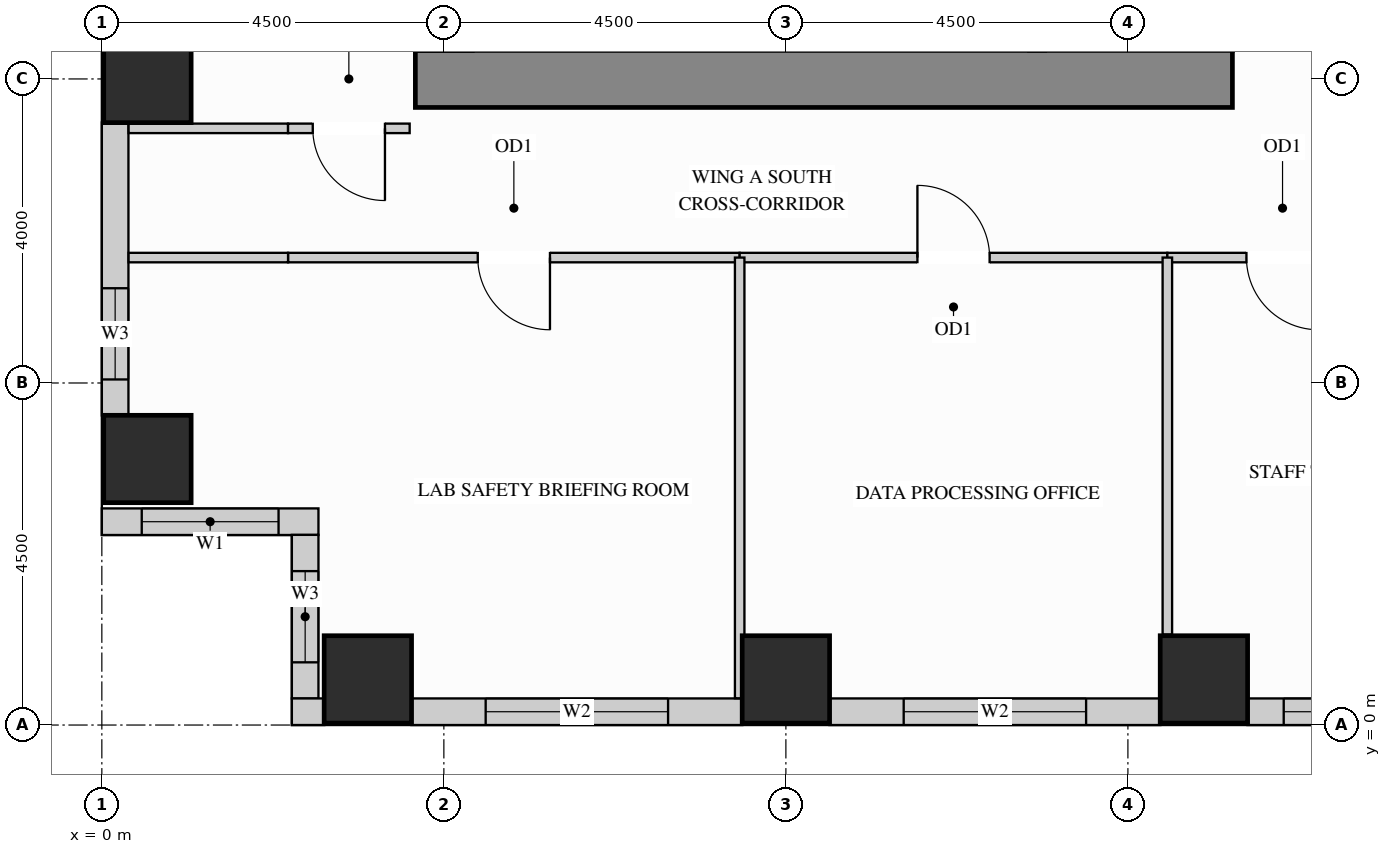
"""IFC4 building model, lengths in metres.
Left out: names, types, materials, properties, quantities, classifications, styles, units other than length and angle.
Written with IfcOpenShell. Run it as: python <this file> out.ifc"""

import sys

from ifc_helpers import new_model, si_unit, direction, frame, frame_2d, origin, origin_2d, place, context, subcontext, project, spatial, rectangle, extrude, source, transform, mapped, element, fill, save


model = new_model("IFC4")
c1 = context("Model", 3, precision=1e-05, world=origin(), true_north=direction((0.0, 1.0)))
c2 = subcontext(c1, "Body", "Model", "MODEL_VIEW")
j1 = project(units=[si_unit("LENGTHUNIT", "METRE"), si_unit("PLANEANGLEUNIT", "RADIAN")], contexts=[c1])
p1 = place(None, origin())
s1 = spatial("IfcSite", under=j1, at=p1, CompositionType="ELEMENT")
p2 = place(p1, origin())
s2 = spatial("IfcBuilding", under=s1, at=p2, CompositionType="ELEMENT")
p3 = place(p2, frame((0.0, 0.0, 95.4)))
s3 = spatial("IfcBuildingStorey", under=s2, at=p3, CompositionType="ELEMENT", Elevation=95.4)
m1 = source(origin(), c2, "Body", "SweptSolid", [
    extrude(rectangle(XDim=1.15, YDim=1.15, at=origin_2d()), origin(), (0.0, 0.0, 1.0), 3.38),
])
for number, where, z_axis, x_axis in (
    (1, (14.5, 0.6, 0.0), (0.0, 0.0, 1.0), (1.0, 0.0, 0.0)),
    (2, (3.5, 0.6, 0.0), (0.0, 0.0, 1.0), (1.0, 0.0, 0.0)),
    (3, (9.0, 0.6, 0.0), (0.0, 0.0, 1.0), (1.0, 0.0, 0.0)),
    (4, (0.6, 3.5, 0.0), (0.0, 0.0, 1.0), (1.0, 0.0, 0.0)),
    (5, (0.6, 8.5, 0.0), (0.0, 0.0, 1.0), (1.0, 0.0, 0.0)),
):
    element("IfcColumn", number, at=place(p3, frame(where, z_axis=z_axis, x_axis=x_axis)), inside=s3, PredefinedType="COLUMN", context=c2, shape_type="MappedRepresentation", body=[
        mapped(m1, transform((0.0, 0.0, 0.0), x_axis=(1.0, 0.0, 0.0), y_axis=(0.0, 1.0, 0.0), z_axis=(0.0, 0.0, 1.0))),
    ])
m2 = source(origin(), c2, "Body", "SweptSolid", [
    extrude(rectangle(XDim=10.75, YDim=0.75, at=frame_2d((5.375, 0.0))), origin(), (0.0, 0.0, 1.0), 3.38),
])
p4 = place(p3, frame((4.125, 8.5, 0.0), z_axis=(0.0, 0.0, 1.0), x_axis=(1.0, 0.0, 0.0)))
e6 = element("IfcWall", 6, at=p4, inside=s3, PredefinedType="SHEAR", context=c2, shape_type="MappedRepresentation", body=[
    mapped(m2, transform((0.0, 0.0, 0.0), x_axis=(1.0, 0.0, 0.0), y_axis=(0.0, 1.0, 0.0), z_axis=(0.0, 0.0, 1.0))),
])
p5 = place(p3, frame((0.175, 7.927, 0.0), z_axis=(0.0, 0.0, 1.0), x_axis=(0.0, -1.0, 0.0)))
e7 = element("IfcWall", 7, at=p5, inside=s3, PredefinedType="SOLIDWALL", context=c2, shape_type="SweptSolid", body=[
    extrude(rectangle(XDim=3.854, YDim=0.35, at=frame_2d((1.927, 0.0))), origin(), (0.0, 0.0, 1.0), 3.365),
])
p6 = place(p5, frame((2.18, 0.0, 0.78)))
e8 = element("IfcOpeningElement", 8, at=p6, cuts=e7, PredefinedType="OPENING", context=c2, shape_type="SweptSolid", body=[
    extrude(rectangle(XDim=1.2, YDim=2.1, at=frame_2d((0.6, 1.05))), frame((0.0, 0.185, 0.0), z_axis=(0.0, -1.0, 0.0), x_axis=(1.0, 0.0, 0.0)), (0.0, 0.0, 1.0), 0.37),
])
p7 = place(p3, frame((0.0, 2.675, 0.0), z_axis=(0.0, 0.0, 1.0), x_axis=(1.0, 0.0, 0.0)))
e9 = element("IfcWall", 9, at=p7, inside=s3, PredefinedType="SOLIDWALL", context=c2, shape_type="SweptSolid", body=[
    extrude(rectangle(XDim=2.85, YDim=0.35, at=frame_2d((1.425, 0.0))), origin(), (0.0, 0.0, 1.0), 3.365),
])
p8 = place(p7, frame((0.525, 0.0, 0.78)))
e10 = element("IfcOpeningElement", 10, at=p8, cuts=e9, PredefinedType="OPENING", context=c2, shape_type="SweptSolid", body=[
    extrude(rectangle(XDim=1.8, YDim=2.1, at=frame_2d((0.9, 1.05))), frame((0.0, 0.185, 0.0), z_axis=(0.0, -1.0, 0.0), x_axis=(1.0, 0.0, 0.0)), (0.0, 0.0, 1.0), 0.37),
])
p9 = place(p3, frame((2.675, 2.502, 0.0), z_axis=(0.0, 0.0, 1.0), x_axis=(0.0, -1.0, 0.0)))
e11 = element("IfcWall", 11, at=p9, inside=s3, PredefinedType="SOLIDWALL", context=c2, shape_type="SweptSolid", body=[
    extrude(rectangle(XDim=2.154, YDim=0.35, at=frame_2d((1.077, 0.0))), origin(), (0.0, 0.0, 1.0), 3.365),
])
p10 = place(p9, frame((0.477, 0.0, 0.78)))
e12 = element("IfcOpeningElement", 12, at=p10, cuts=e11, PredefinedType="OPENING", context=c2, shape_type="SweptSolid", body=[
    extrude(rectangle(XDim=1.2, YDim=2.1, at=frame_2d((0.6, 1.05))), frame((0.0, 0.185, 0.0), z_axis=(0.0, -1.0, 0.0), x_axis=(1.0, 0.0, 0.0)), (0.0, 0.0, 1.0), 0.37),
])
m3 = source(origin(), c2, "Body", "SweptSolid", [
    extrude(rectangle(XDim=0.427, YDim=0.35, at=frame_2d((0.213, 0.0))), origin(), (0.0, 0.0, 1.0), 3.365),
])
p11 = place(p3, frame((2.5, 0.175, 0.0), z_axis=(0.0, 0.0, 1.0), x_axis=(1.0, 0.0, 0.0)))
e13 = element("IfcWall", 13, at=p11, inside=s3, PredefinedType="SOLIDWALL", context=c2, shape_type="MappedRepresentation", body=[
    mapped(m3, transform((0.0, 0.0, 0.0), x_axis=(1.0, 0.0, 0.0), y_axis=(0.0, 1.0, 0.0), z_axis=(0.0, 0.0, 1.0))),
])
p12 = place(p3, frame((4.073, 0.175, 0.0), z_axis=(0.0, 0.0, 1.0), x_axis=(1.0, 0.0, 0.0)))
e14 = element("IfcWall", 14, at=p12, inside=s3, PredefinedType="SOLIDWALL", context=c2, shape_type="SweptSolid", body=[
    extrude(rectangle(XDim=4.354, YDim=0.35, at=frame_2d((2.177, 0.0))), origin(), (0.0, 0.0, 1.0), 3.365),
])
p13 = place(p12, frame((0.977, 0.0, 0.78)))
e15 = element("IfcOpeningElement", 15, at=p13, cuts=e14, PredefinedType="OPENING", context=c2, shape_type="SweptSolid", body=[
    extrude(rectangle(XDim=2.4, YDim=2.1, at=frame_2d((1.2, 1.05))), frame((0.0, 0.185, 0.0), z_axis=(0.0, -1.0, 0.0), x_axis=(1.0, 0.0, 0.0)), (0.0, 0.0, 1.0), 0.37),
])
p14 = place(p3, frame((9.573, 0.175, 0.0), z_axis=(0.0, 0.0, 1.0), x_axis=(1.0, 0.0, 0.0)))
e16 = element("IfcWall", 16, at=p14, inside=s3, PredefinedType="SOLIDWALL", context=c2, shape_type="SweptSolid", body=[
    extrude(rectangle(XDim=4.354, YDim=0.35, at=frame_2d((2.177, 0.0))), origin(), (0.0, 0.0, 1.0), 3.365),
])
p15 = place(p14, frame((0.977, 0.0, 0.78)))
e17 = element("IfcOpeningElement", 17, at=p15, cuts=e16, PredefinedType="OPENING", context=c2, shape_type="SweptSolid", body=[
    extrude(rectangle(XDim=2.4, YDim=2.1, at=frame_2d((1.2, 1.05))), frame((0.0, 0.185, 0.0), z_axis=(0.0, -1.0, 0.0), x_axis=(1.0, 0.0, 0.0)), (0.0, 0.0, 1.0), 0.37),
])
p16 = place(p3, frame((15.073, 0.175, 0.0), z_axis=(0.0, 0.0, 1.0), x_axis=(1.0, 0.0, 0.0)))
e18 = element("IfcWall", 18, at=p16, inside=s3, PredefinedType="SOLIDWALL", context=c2, shape_type="SweptSolid", body=[
    extrude(rectangle(XDim=3.354, YDim=0.35, at=frame_2d((1.677, 0.0))), origin(), (0.0, 0.0, 1.0), 3.365),
])
p17 = place(p16, frame((0.477, 0.0, 0.78)))
e19 = element("IfcOpeningElement", 19, at=p17, cuts=e18, PredefinedType="OPENING", context=c2, shape_type="SweptSolid", body=[
    extrude(rectangle(XDim=2.4, YDim=2.1, at=frame_2d((1.2, 1.05))), frame((0.0, 0.185, 0.0), z_axis=(0.0, -1.0, 0.0), x_axis=(1.0, 0.0, 0.0)), (0.0, 0.0, 1.0), 0.37),
])
m4 = source(origin(), c2, "Body", "SweptSolid", [
    extrude(rectangle(XDim=2.098, YDim=0.125, at=frame_2d((1.049, 0.0))), origin(), (0.0, 0.0, 1.0), 3.365),
])
p18 = place(p3, frame((0.352, 7.85, 0.0), z_axis=(0.0, 0.0, 1.0), x_axis=(1.0, 0.0, 0.0)))
e20 = element("IfcWall", 20, at=p18, inside=s3, PredefinedType="PARTITIONING", context=c2, shape_type="MappedRepresentation", body=[
    mapped(m4, transform((0.0, 0.0, 0.0), x_axis=(1.0, 0.0, 0.0), y_axis=(0.0, 1.0, 0.0), z_axis=(0.0, 0.0, 1.0))),
])
p19 = place(p3, frame((2.45, 7.85, 0.0), z_axis=(0.0, 0.0, 1.0), x_axis=(1.0, 0.0, 0.0)))
e21 = element("IfcWall", 21, at=p19, inside=s3, PredefinedType="PARTITIONING", context=c2, shape_type="SweptSolid", body=[
    extrude(rectangle(XDim=1.6, YDim=0.125, at=frame_2d((0.8, 0.0))), origin(), (0.0, 0.0, 1.0), 3.365),
])
p20 = place(p19, frame((0.325, 0.0, 0.0)))
e22 = element("IfcOpeningElement", 22, at=p20, cuts=e21, PredefinedType="OPENING", context=c2, shape_type="SweptSolid", body=[
    extrude(rectangle(XDim=0.95, YDim=2.15, at=frame_2d((0.475, 1.075))), frame((0.0, 0.073, 0.0), z_axis=(0.0, -1.0, 0.0), x_axis=(1.0, 0.0, 0.0)), (0.0, 0.0, 1.0), 0.145),
])
p21 = place(p3, frame((2.45, 6.15, 0.0), z_axis=(0.0, 0.0, 1.0), x_axis=(1.0, 0.0, 0.0)))
e23 = element("IfcWall", 23, at=p21, inside=s3, PredefinedType="PARTITIONING", context=c2, shape_type="SweptSolid", body=[
    extrude(rectangle(XDim=5.942, YDim=0.125, at=frame_2d((2.971, 0.0))), origin(), (0.0, 0.0, 1.0), 3.365),
])
p22 = place(p21, frame((2.496, 0.0, 0.0)))
e24 = element("IfcOpeningElement", 24, at=p22, cuts=e23, PredefinedType="OPENING", context=c2, shape_type="SweptSolid", body=[
    extrude(rectangle(XDim=0.95, YDim=2.15, at=frame_2d((0.475, 1.075))), frame((0.0, 0.073, 0.0), z_axis=(0.0, -1.0, 0.0), x_axis=(1.0, 0.0, 0.0)), (0.0, 0.0, 1.0), 0.145),
])
p23 = place(p3, frame((8.392, 6.15, 0.0), z_axis=(0.0, 0.0, 1.0), x_axis=(1.0, 0.0, 0.0)))
e25 = element("IfcWall", 25, at=p23, inside=s3, PredefinedType="PARTITIONING", context=c2, shape_type="SweptSolid", body=[
    extrude(rectangle(XDim=5.627, YDim=0.125, at=frame_2d((2.813, 0.0))), origin(), (0.0, 0.0, 1.0), 3.365),
])
p24 = place(p23, frame((2.338, 0.0, 0.0)))
e26 = element("IfcOpeningElement", 26, at=p24, cuts=e25, PredefinedType="OPENING", context=c2, shape_type="SweptSolid", body=[
    extrude(rectangle(XDim=0.95, YDim=2.15, at=frame_2d((0.475, 1.075))), frame((0.0, 0.073, 0.0), z_axis=(0.0, -1.0, 0.0), x_axis=(1.0, 0.0, 0.0)), (0.0, 0.0, 1.0), 0.145),
])
p25 = place(p3, frame((14.019, 6.15, 0.0), z_axis=(0.0, 0.0, 1.0), x_axis=(1.0, 0.0, 0.0)))
e27 = element("IfcWall", 27, at=p25, inside=s3, PredefinedType="PARTITIONING", context=c2, shape_type="SweptSolid", body=[
    extrude(rectangle(XDim=3.031, YDim=0.125, at=frame_2d((1.516, 0.0))), origin(), (0.0, 0.0, 1.0), 3.365),
])
p26 = place(p25, frame((1.041, 0.0, 0.0)))
e28 = element("IfcOpeningElement", 28, at=p26, cuts=e27, PredefinedType="OPENING", context=c2, shape_type="SweptSolid", body=[
    extrude(rectangle(XDim=0.95, YDim=2.15, at=frame_2d((0.475, 1.075))), frame((0.0, 0.073, 0.0), z_axis=(0.0, -1.0, 0.0), x_axis=(1.0, 0.0, 0.0)), (0.0, 0.0, 1.0), 0.145),
])
p27 = place(p3, frame((0.352, 6.15, 0.0), z_axis=(0.0, 0.0, 1.0), x_axis=(1.0, 0.0, 0.0)))
e29 = element("IfcWall", 29, at=p27, inside=s3, PredefinedType="PARTITIONING", context=c2, shape_type="MappedRepresentation", body=[
    mapped(m4, transform((0.0, 0.0, 0.0), x_axis=(1.0, 0.0, 0.0), y_axis=(0.0, 1.0, 0.0), z_axis=(0.0, 0.0, 1.0))),
])
m5 = source(origin(), c2, "Body", "SweptSolid", [
    extrude(rectangle(XDim=5.798, YDim=0.125, at=frame_2d((2.899, 0.0))), origin(), (0.0, 0.0, 1.0), 3.365),
])
p28 = place(p3, frame((8.392, 0.352, 0.0), z_axis=(0.0, 0.0, 1.0), x_axis=(0.0, 1.0, 0.0)))
e30 = element("IfcWall", 30, at=p28, inside=s3, PredefinedType="PARTITIONING", context=c2, shape_type="MappedRepresentation", body=[
    mapped(m5, transform((0.0, 0.0, 0.0), x_axis=(1.0, 0.0, 0.0), y_axis=(0.0, 1.0, 0.0), z_axis=(0.0, 0.0, 1.0))),
])
m6 = source(origin(), c2, "Body", "SweptSolid", [
    extrude(rectangle(XDim=4.96, YDim=0.125, at=frame_2d((2.48, 0.0))), origin(), (0.0, 0.0, 1.0), 3.365),
])
p29 = place(p3, frame((14.019, 1.19, 0.0), z_axis=(0.0, 0.0, 1.0), x_axis=(0.0, 1.0, 0.0)))
e31 = element("IfcWall", 31, at=p29, inside=s3, PredefinedType="PARTITIONING", context=c2, shape_type="MappedRepresentation", body=[
    mapped(m6, transform((0.0, 0.0, 0.0), x_axis=(1.0, 0.0, 0.0), y_axis=(0.0, 1.0, 0.0), z_axis=(0.0, 0.0, 1.0))),
])
m7 = source(origin(), c2, "Body", "SweptSolid", [
    extrude(rectangle(XDim=0.95, YDim=2.15, at=frame_2d((0.475, 1.075))), frame((0.0, 0.025, 0.0), z_axis=(0.0, -1.0, 0.0), x_axis=(1.0, 0.0, 0.0)), (0.0, 0.0, 1.0), 0.05),
])
p30 = place(p22, origin())
e32 = element("IfcDoor", 32, at=p30, inside=s3, OperationType="SINGLE_SWING_RIGHT", PredefinedType="DOOR", context=c2, shape_type="MappedRepresentation", body=[
    mapped(m7, transform((0.0, 0.0, 0.0), x_axis=(1.0, 0.0, 0.0), y_axis=(0.0, 1.0, 0.0), z_axis=(0.0, 0.0, 1.0))),
])
fill(e24, e32)
p31 = place(p24, origin())
e33 = element("IfcDoor", 33, at=p31, inside=s3, OperationType="SINGLE_SWING_LEFT", PredefinedType="DOOR", context=c2, shape_type="MappedRepresentation", body=[
    mapped(m7, transform((0.0, 0.0, 0.0), x_axis=(1.0, 0.0, 0.0), y_axis=(0.0, 1.0, 0.0), z_axis=(0.0, 0.0, 1.0))),
])
fill(e26, e33)
p32 = place(p26, origin())
e34 = element("IfcDoor", 34, at=p32, inside=s3, OperationType="SINGLE_SWING_RIGHT", PredefinedType="DOOR", context=c2, shape_type="MappedRepresentation", body=[
    mapped(m7, transform((0.0, 0.0, 0.0), x_axis=(1.0, 0.0, 0.0), y_axis=(0.0, 1.0, 0.0), z_axis=(0.0, 0.0, 1.0))),
])
fill(e28, e34)
p33 = place(p20, origin())
e35 = element("IfcDoor", 35, at=p33, inside=s3, OperationType="SINGLE_SWING_RIGHT", PredefinedType="DOOR", context=c2, shape_type="MappedRepresentation", body=[
    mapped(m7, transform((0.0, 0.0, 0.0), x_axis=(1.0, 0.0, 0.0), y_axis=(0.0, 1.0, 0.0), z_axis=(0.0, 0.0, 1.0))),
])
fill(e22, e35)
m8 = source(origin(), c2, "Body", "SweptSolid", [
    extrude(rectangle(XDim=1.8, YDim=2.1, at=frame_2d((0.9, 1.05))), frame((0.0, 0.03, 0.0), z_axis=(0.0, -1.0, 0.0), x_axis=(1.0, 0.0, 0.0)), (0.0, 0.0, 1.0), 0.06),
])
p34 = place(p8, origin())
e36 = element("IfcWindow", 36, at=p34, inside=s3, PartitioningType="SINGLE_PANEL", PredefinedType="WINDOW", context=c2, shape_type="MappedRepresentation", body=[
    mapped(m8, transform((0.0, 0.0, 0.0), x_axis=(1.0, 0.0, 0.0), y_axis=(0.0, 1.0, 0.0), z_axis=(0.0, 0.0, 1.0))),
])
fill(e10, e36)
m9 = source(origin(), c2, "Body", "SweptSolid", [
    extrude(rectangle(XDim=2.4, YDim=2.1, at=frame_2d((1.2, 1.05))), frame((0.0, 0.03, 0.0), z_axis=(0.0, -1.0, 0.0), x_axis=(1.0, 0.0, 0.0)), (0.0, 0.0, 1.0), 0.06),
])
p35 = place(p13, origin())
e37 = element("IfcWindow", 37, at=p35, inside=s3, PartitioningType="SINGLE_PANEL", PredefinedType="WINDOW", context=c2, shape_type="MappedRepresentation", body=[
    mapped(m9, transform((0.0, 0.0, 0.0), x_axis=(1.0, 0.0, 0.0), y_axis=(0.0, 1.0, 0.0), z_axis=(0.0, 0.0, 1.0))),
])
fill(e15, e37)
p36 = place(p15, origin())
e38 = element("IfcWindow", 38, at=p36, inside=s3, PartitioningType="SINGLE_PANEL", PredefinedType="WINDOW", context=c2, shape_type="MappedRepresentation", body=[
    mapped(m9, transform((0.0, 0.0, 0.0), x_axis=(1.0, 0.0, 0.0), y_axis=(0.0, 1.0, 0.0), z_axis=(0.0, 0.0, 1.0))),
])
fill(e17, e38)
p37 = place(p17, origin())
e39 = element("IfcWindow", 39, at=p37, inside=s3, PartitioningType="SINGLE_PANEL", PredefinedType="WINDOW", context=c2, shape_type="MappedRepresentation", body=[
    mapped(m9, transform((0.0, 0.0, 0.0), x_axis=(1.0, 0.0, 0.0), y_axis=(0.0, 1.0, 0.0), z_axis=(0.0, 0.0, 1.0))),
])
fill(e19, e39)
m10 = source(origin(), c2, "Body", "SweptSolid", [
    extrude(rectangle(XDim=1.2, YDim=2.1, at=frame_2d((0.6, 1.05))), frame((0.0, 0.03, 0.0), z_axis=(0.0, -1.0, 0.0), x_axis=(1.0, 0.0, 0.0)), (0.0, 0.0, 1.0), 0.06),
])
p38 = place(p6, origin())
e40 = element("IfcWindow", 40, at=p38, inside=s3, PartitioningType="SINGLE_PANEL", PredefinedType="WINDOW", context=c2, shape_type="MappedRepresentation", body=[
    mapped(m10, transform((0.0, 0.0, 0.0), x_axis=(1.0, 0.0, 0.0), y_axis=(0.0, 1.0, 0.0), z_axis=(0.0, 0.0, 1.0))),
])
fill(e8, e40)
p39 = place(p10, origin())
e41 = element("IfcWindow", 41, at=p39, inside=s3, PartitioningType="SINGLE_PANEL", PredefinedType="WINDOW", context=c2, shape_type="MappedRepresentation", body=[
    mapped(m10, transform((0.0, 0.0, 0.0), x_axis=(1.0, 0.0, 0.0), y_axis=(0.0, 1.0, 0.0), z_axis=(0.0, 0.0, 1.0))),
])
fill(e12, e41)
save(model, sys.argv[1])
